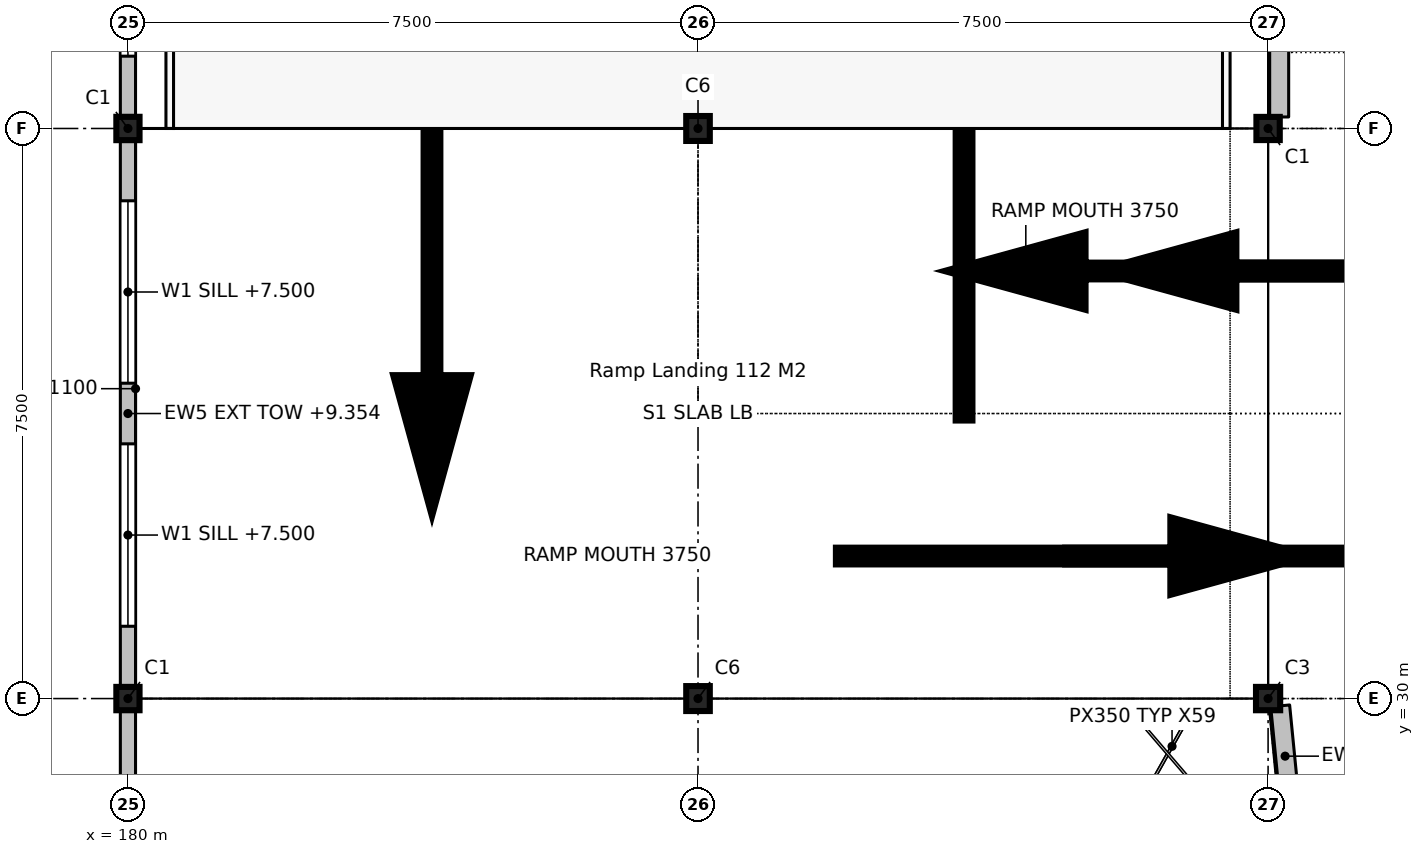
"""IFC4 building model, lengths in metres.
Left out: names, types, materials, properties, quantities, classifications, styles, units other than length and angle.
Written with IfcOpenShell. Run it as: python <this file> out.ifc"""

import sys

from ifc_helpers import new_model, si_unit, direction, frame, frame_2d, origin, origin_2d, place, context, subcontext, project, spatial, rectangle, i_section, extrude, element, fill, save


model = new_model("IFC4")
c1 = context("Model", 3, precision=1e-05, world=origin(), true_north=direction((0.0, 1.0)))
c2 = subcontext(c1, "Body", "Model", "MODEL_VIEW")
j1 = project(units=[si_unit("LENGTHUNIT", "METRE"), si_unit("PLANEANGLEUNIT", "RADIAN")], contexts=[c1])
p1 = place(None, origin())
s1 = spatial("IfcSite", under=j1, at=p1, CompositionType="ELEMENT")
p2 = place(p1, origin())
s2 = spatial("IfcBuilding", under=s1, at=p2, CompositionType="ELEMENT")
p3 = place(p2, frame((0.0, 0.0, 6.6)))
s3 = spatial("IfcBuildingStorey", under=s2, at=p3, CompositionType="ELEMENT", Elevation=6.6)
for number, where, z_axis, x_axis in (
    (1, (180.0, 30.0, 0.0), (0.0, 0.0, 1.0), (1.0, 0.0, 0.0)),
    (2, (180.0, 37.5, 0.0), (0.0, 0.0, 1.0), (1.0, 0.0, 0.0)),
):
    element("IfcColumn", number, at=place(p3, frame(where, z_axis=z_axis, x_axis=x_axis)), inside=s3, PredefinedType="COLUMN", context=c2, shape_type="SweptSolid", body=[
        extrude(i_section(OverallWidth=0.305, OverallDepth=0.307, WebThickness=0.01, FlangeThickness=0.015, FilletRadius=0.015, at=origin_2d()), origin(), (0.0, 0.0, 1.0), 3.3),
    ])
for number, where, z_axis, x_axis in (
    (3, (187.5, 30.0, 0.0), (0.0, 0.0, 1.0), (1.0, 0.0, 0.0)),
    (4, (187.5, 37.5, 0.0), (0.0, 0.0, 1.0), (1.0, 0.0, 0.0)),
):
    element("IfcColumn", number, at=place(p3, frame(where, z_axis=z_axis, x_axis=x_axis)), inside=s3, PredefinedType="COLUMN", context=c2, shape_type="SweptSolid", body=[
        extrude(i_section(OverallWidth=0.31, OverallDepth=0.328, WebThickness=0.015, FlangeThickness=0.025, FilletRadius=0.015, at=origin_2d()), origin(), (0.0, 0.0, 1.0), 3.3),
    ])
p4 = place(p3, frame((195.0, 37.5, 0.0), z_axis=(0.0, 0.0, 1.0), x_axis=(0.0, 1.0, 0.0)))
e5 = element("IfcColumn", 5, at=p4, inside=s3, PredefinedType="COLUMN", context=c2, shape_type="SweptSolid", body=[
    extrude(i_section(OverallWidth=0.305, OverallDepth=0.307, WebThickness=0.01, FlangeThickness=0.015, FilletRadius=0.015, at=origin_2d()), origin(), (0.0, 0.0, 1.0), 3.3),
])
p5 = place(p3, frame((195.0, 30.0, 0.0), z_axis=(0.0, 0.0, 1.0), x_axis=(0.0, 1.0, 0.0)))
e6 = element("IfcColumn", 6, at=p5, inside=s3, PredefinedType="COLUMN", context=c2, shape_type="SweptSolid", body=[
    extrude(i_section(OverallWidth=0.307, OverallDepth=0.318, WebThickness=0.013, FlangeThickness=0.021, FilletRadius=0.015, at=origin_2d()), origin(), (0.0, 0.0, 1.0), 3.3),
])
p6 = place(p3, frame((195.146, 44.848, 0.0), z_axis=(0.0, 0.0, 1.0), x_axis=(0.0, -1.0, 0.0)))
e7 = element("IfcWall", 7, at=p6, inside=s3, PredefinedType="SOLIDWALL", context=c2, shape_type="SweptSolid", body=[
    extrude(rectangle(XDim=7.197, YDim=0.25, at=frame_2d((3.598, 0.0))), origin(), (0.0, 0.0, 1.0), 1.1),
])
p7 = place(p3, frame((195.159, 29.904, 0.0), z_axis=(0.0, 0.0, 1.0), x_axis=(0.098067173263, -0.995179797588, 0.0)))
e8 = element("IfcWall", 8, at=p7, inside=s3, PredefinedType="SOLIDWALL", context=c2, shape_type="SweptSolid", body=[
    extrude(rectangle(XDim=1.329, YDim=0.25, at=frame_2d((0.665, 0.0))), origin(), (0.0, 0.0, 1.0), 1.1),
])
p8 = place(p3, frame((180.0, 22.654, 0.0), z_axis=(0.0, 0.0, 1.0), x_axis=(0.0, 1.0, 0.0)))
e9 = element("IfcWall", 9, at=p8, inside=s3, PredefinedType="SOLIDWALL", context=c2, shape_type="SweptSolid", body=[
    extrude(rectangle(XDim=7.193, YDim=0.2, at=frame_2d((3.596, 0.0))), origin(), (0.0, 0.0, 1.0), 2.71),
])
p9 = place(p8, frame((1.098, 0.0, 1.1)))
e10 = element("IfcOpeningElement", 10, at=p9, cuts=e9, PredefinedType="OPENING", context=c2, shape_type="SweptSolid", body=[
    extrude(rectangle(XDim=1.8, YDim=1.4, at=frame_2d((0.9, 0.7))), frame((0.0, 0.11, 0.0), z_axis=(0.0, -1.0, 0.0), x_axis=(1.0, 0.0, 0.0)), (0.0, 0.0, 1.0), 0.22),
])
p10 = place(p8, frame((4.295, 0.0, 1.1)))
e11 = element("IfcOpeningElement", 11, at=p10, cuts=e9, PredefinedType="OPENING", context=c2, shape_type="SweptSolid", body=[
    extrude(rectangle(XDim=1.8, YDim=1.4, at=frame_2d((0.9, 0.7))), frame((0.0, 0.11, 0.0), z_axis=(0.0, -1.0, 0.0), x_axis=(1.0, 0.0, 0.0)), (0.0, 0.0, 1.0), 0.22),
])
p11 = place(p3, frame((180.0, 30.154, 0.0), z_axis=(0.0, 0.0, 1.0), x_axis=(0.0, 1.0, 0.0)))
e12 = element("IfcWall", 12, at=p11, inside=s3, PredefinedType="SOLIDWALL", context=c2, shape_type="SweptSolid", body=[
    extrude(rectangle(XDim=7.193, YDim=0.2, at=frame_2d((3.596, 0.0))), origin(), (0.0, 0.0, 1.0), 2.754),
])
p12 = place(p11, frame((0.798, 0.0, 0.9)))
e13 = element("IfcOpeningElement", 13, at=p12, cuts=e12, PredefinedType="OPENING", context=c2, shape_type="SweptSolid", body=[
    extrude(rectangle(XDim=2.4, YDim=1.5, at=frame_2d((1.2, 0.75))), frame((0.0, 0.11, 0.0), z_axis=(0.0, -1.0, 0.0), x_axis=(1.0, 0.0, 0.0)), (0.0, 0.0, 1.0), 0.22),
])
p13 = place(p11, frame((3.995, 0.0, 0.9)))
e14 = element("IfcOpeningElement", 14, at=p13, cuts=e12, PredefinedType="OPENING", context=c2, shape_type="SweptSolid", body=[
    extrude(rectangle(XDim=2.4, YDim=1.5, at=frame_2d((1.2, 0.75))), frame((0.0, 0.11, 0.0), z_axis=(0.0, -1.0, 0.0), x_axis=(1.0, 0.0, 0.0)), (0.0, 0.0, 1.0), 0.22),
])
p14 = place(p3, frame((180.0, 37.654, 0.0), z_axis=(0.0, 0.0, 1.0), x_axis=(0.0, 1.0, 0.0)))
e15 = element("IfcWall", 15, at=p14, inside=s3, PredefinedType="SOLIDWALL", context=c2, shape_type="SweptSolid", body=[
    extrude(rectangle(XDim=7.193, YDim=0.2, at=frame_2d((3.596, 0.0))), origin(), (0.0, 0.0, 1.0), 2.71),
])
p15 = place(p14, frame((0.798, 0.0, 0.9)))
e16 = element("IfcOpeningElement", 16, at=p15, cuts=e15, PredefinedType="OPENING", context=c2, shape_type="SweptSolid", body=[
    extrude(rectangle(XDim=2.4, YDim=1.5, at=frame_2d((1.2, 0.75))), frame((0.0, 0.11, 0.0), z_axis=(0.0, -1.0, 0.0), x_axis=(1.0, 0.0, 0.0)), (0.0, 0.0, 1.0), 0.22),
])
p16 = place(p14, frame((3.995, 0.0, 0.9)))
e17 = element("IfcOpeningElement", 17, at=p16, cuts=e15, PredefinedType="OPENING", context=c2, shape_type="SweptSolid", body=[
    extrude(rectangle(XDim=2.4, YDim=1.5, at=frame_2d((1.2, 0.75))), frame((0.0, 0.11, 0.0), z_axis=(0.0, -1.0, 0.0), x_axis=(1.0, 0.0, 0.0)), (0.0, 0.0, 1.0), 0.22),
])
p17 = place(p12, origin())
e18 = element("IfcWindow", 18, at=p17, inside=s3, PartitioningType="DOUBLE_PANEL_VERTICAL", PredefinedType="WINDOW", context=c2, shape_type="SweptSolid", body=[
    extrude(rectangle(XDim=2.4, YDim=1.5, at=frame_2d((1.2, 0.75))), frame((0.0, 0.03, 0.0), z_axis=(0.0, -1.0, 0.0), x_axis=(1.0, 0.0, 0.0)), (0.0, 0.0, 1.0), 0.06),
])
fill(e13, e18)
p18 = place(p13, origin())
e19 = element("IfcWindow", 19, at=p18, inside=s3, PartitioningType="DOUBLE_PANEL_VERTICAL", PredefinedType="WINDOW", context=c2, shape_type="SweptSolid", body=[
    extrude(rectangle(XDim=2.4, YDim=1.5, at=frame_2d((1.2, 0.75))), frame((0.0, 0.03, 0.0), z_axis=(0.0, -1.0, 0.0), x_axis=(1.0, 0.0, 0.0)), (0.0, 0.0, 1.0), 0.06),
])
fill(e14, e19)
p19 = place(p15, origin())
e20 = element("IfcWindow", 20, at=p19, inside=s3, PartitioningType="DOUBLE_PANEL_VERTICAL", PredefinedType="WINDOW", context=c2, shape_type="SweptSolid", body=[
    extrude(rectangle(XDim=2.4, YDim=1.5, at=frame_2d((1.2, 0.75))), frame((0.0, 0.03, 0.0), z_axis=(0.0, -1.0, 0.0), x_axis=(1.0, 0.0, 0.0)), (0.0, 0.0, 1.0), 0.06),
])
fill(e16, e20)
save(model, sys.argv[1])
